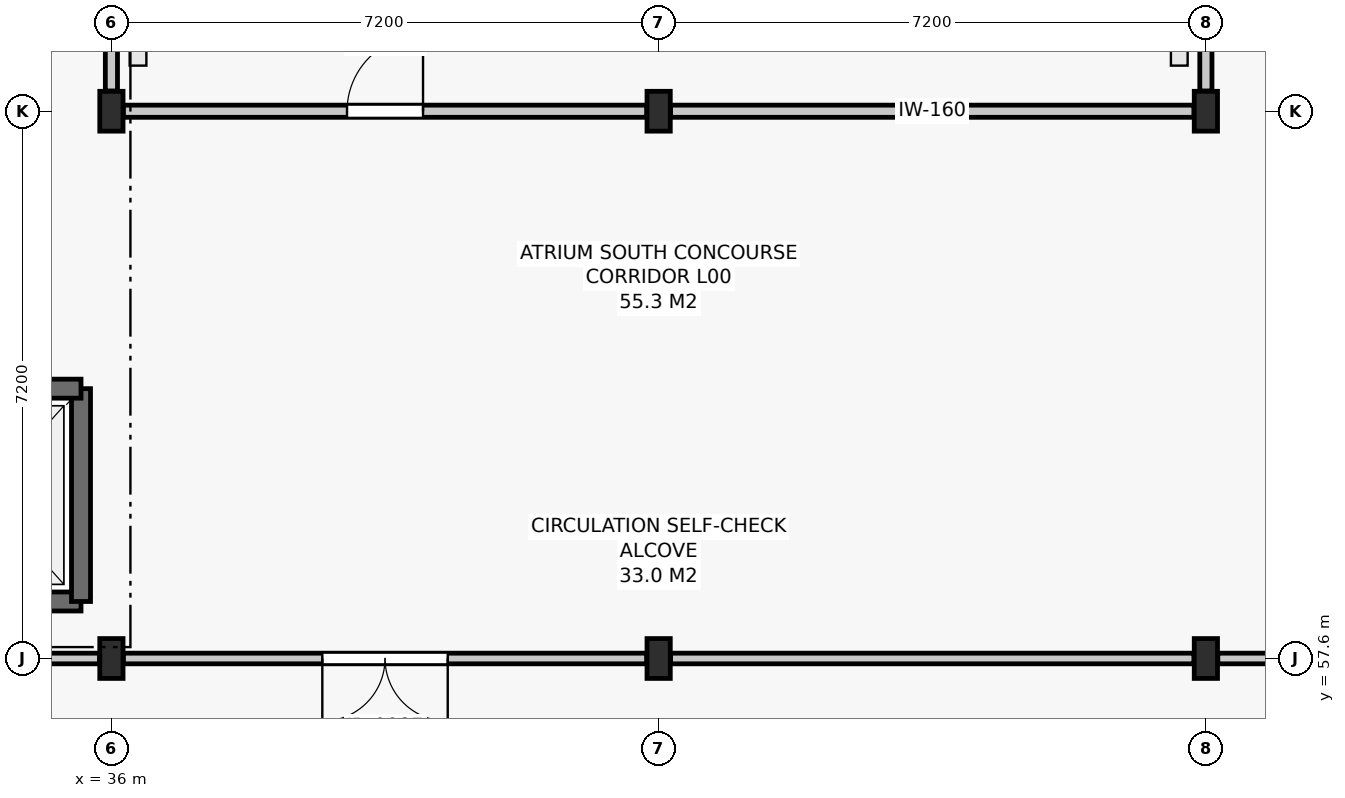
"""IFC4 building model, lengths in metres.
Left out: names, types, materials, properties, quantities, classifications, styles, units other than length and angle.
Written with IfcOpenShell. Run it as: python <this file> out.ifc"""

import sys

from ifc_helpers import new_model, si_unit, direction, frame, frame_2d, origin, origin_2d, place, context, subcontext, project, spatial, rectangle, i_section, extrude, element, fill, save


model = new_model("IFC4")
c1 = context("Model", 3, precision=1e-05, world=origin(), true_north=direction((0.0, 1.0)))
c2 = subcontext(c1, "Body", "Model", "MODEL_VIEW")
j1 = project(units=[si_unit("LENGTHUNIT", "METRE"), si_unit("PLANEANGLEUNIT", "RADIAN")], contexts=[c1])
p1 = place(None, origin())
s1 = spatial("IfcSite", under=j1, at=p1, CompositionType="ELEMENT")
p2 = place(p1, origin())
s2 = spatial("IfcBuilding", under=s1, at=p2, CompositionType="ELEMENT")
p3 = place(p2, origin())
s3 = spatial("IfcBuildingStorey", under=s2, at=p3, CompositionType="ELEMENT", Elevation=0.0)
for number, where, z_axis, x_axis in (
    (1, (36.0, 57.6, 0.0), (0.0, 0.0, 1.0), (1.0, 0.0, 0.0)),
    (2, (36.0, 64.8, 0.0), (0.0, 0.0, 1.0), (1.0, 0.0, 0.0)),
    (3, (43.2, 57.6, 0.0), (0.0, 0.0, 1.0), (1.0, 0.0, 0.0)),
    (4, (43.2, 64.8, 0.0), (0.0, 0.0, 1.0), (1.0, 0.0, 0.0)),
    (5, (50.4, 57.6, 0.0), (0.0, 0.0, 1.0), (1.0, 0.0, 0.0)),
    (6, (50.4, 64.8, 0.0), (0.0, 0.0, 1.0), (1.0, 0.0, 0.0)),
):
    element("IfcColumn", number, at=place(p3, frame(where, z_axis=z_axis, x_axis=x_axis)), inside=s3, PredefinedType="COLUMN", context=c2, shape_type="SweptSolid", body=[
        extrude(i_section(OverallWidth=0.306, OverallDepth=0.524, WebThickness=0.021, FlangeThickness=0.04, FilletRadius=0.027, at=origin_2d()), origin(), (0.0, 0.0, 1.0), 5.4),
    ])
p4 = place(p3, frame((33.05, 58.35, 0.0), z_axis=(0.0, 0.0, 1.0), x_axis=(1.0, 0.0, 0.0)))
e7 = element("IfcWall", 7, at=p4, inside=s3, PredefinedType="SHEAR", context=c2, shape_type="SweptSolid", body=[
    extrude(rectangle(XDim=2.55, YDim=0.25, at=frame_2d((1.275, 0.0))), origin(), (0.0, 0.0, 1.0), 5.12),
])
p5 = place(p3, frame((35.6, 58.35, 0.0), z_axis=(0.0, 0.0, 1.0), x_axis=(0.0, 1.0, 0.0)))
e8 = element("IfcWall", 8, at=p5, inside=s3, PredefinedType="SHEAR", context=c2, shape_type="SweptSolid", body=[
    extrude(rectangle(XDim=2.8, YDim=0.25, at=frame_2d((1.4, 0.0))), origin(), (0.0, 0.0, 1.0), 5.12),
])
p6 = place(p3, frame((35.6, 61.15, 0.0), z_axis=(0.0, 0.0, 1.0), x_axis=(-1.0, 0.0, 0.0)))
e9 = element("IfcWall", 9, at=p6, inside=s3, PredefinedType="SHEAR", context=c2, shape_type="SweptSolid", body=[
    extrude(rectangle(XDim=2.55, YDim=0.25, at=frame_2d((1.275, 0.0))), origin(), (0.0, 0.0, 1.0), 5.12),
])
p7 = place(p6, frame((0.725, 0.0, 0.0)))
e10 = element("IfcOpeningElement", 10, at=p7, cuts=e9, PredefinedType="OPENING", context=c2, shape_type="SweptSolid", body=[
    extrude(rectangle(XDim=1.1, YDim=2.1, at=frame_2d((0.55, 1.05))), frame((0.0, 0.137, 0.0), z_axis=(0.0, -1.0, 0.0), x_axis=(1.0, 0.0, 0.0)), (0.0, 0.0, 1.0), 0.274),
])
p8 = place(p3, frame((36.157, 64.8, 0.0), z_axis=(0.0, 0.0, 1.0), x_axis=(1.0, 0.0, 0.0)))
e11 = element("IfcWall", 11, at=p8, inside=s3, PredefinedType="PARTITIONING", context=c2, shape_type="SweptSolid", body=[
    extrude(rectangle(XDim=6.886, YDim=0.16, at=frame_2d((3.443, 0.0))), origin(), (0.0, 0.0, 1.0), 5.105),
])
p9 = place(p8, frame((2.943, 0.0, 0.0)))
e12 = element("IfcOpeningElement", 12, at=p9, cuts=e11, PredefinedType="OPENING", context=c2, shape_type="SweptSolid", body=[
    extrude(rectangle(XDim=1.0, YDim=2.15, at=frame_2d((0.5, 1.075))), frame((0.0, 0.092, 0.0), z_axis=(0.0, -1.0, 0.0), x_axis=(1.0, 0.0, 0.0)), (0.0, 0.0, 1.0), 0.184),
])
p10 = place(p3, frame((43.357, 64.8, 0.0), z_axis=(0.0, 0.0, 1.0), x_axis=(1.0, 0.0, 0.0)))
e13 = element("IfcWall", 13, at=p10, inside=s3, PredefinedType="PARTITIONING", context=c2, shape_type="SweptSolid", body=[
    extrude(rectangle(XDim=6.886, YDim=0.16, at=frame_2d((3.443, 0.0))), origin(), (0.0, 0.0, 1.0), 5.105),
])
p11 = place(p3, frame((28.954, 57.6, 0.0), z_axis=(0.0, 0.0, 1.0), x_axis=(1.0, 0.0, 0.0)))
e14 = element("IfcWall", 14, at=p11, inside=s3, PredefinedType="PARTITIONING", context=c2, shape_type="SweptSolid", body=[
    extrude(rectangle(XDim=6.889, YDim=0.14, at=frame_2d((3.444, 0.0))), origin(), (0.0, 0.0, 1.0), 4.615),
])
p12 = place(p3, frame((36.157, 57.6, 0.0), z_axis=(0.0, 0.0, 1.0), x_axis=(1.0, 0.0, 0.0)))
e15 = element("IfcWall", 15, at=p12, inside=s3, PredefinedType="PARTITIONING", context=c2, shape_type="SweptSolid", body=[
    extrude(rectangle(XDim=6.886, YDim=0.14, at=frame_2d((3.443, 0.0))), origin(), (0.0, 0.0, 1.0), 4.615),
])
p13 = place(p12, frame((2.618, 0.0, 0.0)))
e16 = element("IfcOpeningElement", 16, at=p13, cuts=e15, PredefinedType="OPENING", context=c2, shape_type="SweptSolid", body=[
    extrude(rectangle(XDim=1.65, YDim=2.25, at=frame_2d((0.825, 1.125))), frame((0.0, 0.082, 0.0), z_axis=(0.0, -1.0, 0.0), x_axis=(1.0, 0.0, 0.0)), (0.0, 0.0, 1.0), 0.164),
])
p14 = place(p3, frame((43.357, 57.6, 0.0), z_axis=(0.0, 0.0, 1.0), x_axis=(1.0, 0.0, 0.0)))
e17 = element("IfcWall", 17, at=p14, inside=s3, PredefinedType="PARTITIONING", context=c2, shape_type="SweptSolid", body=[
    extrude(rectangle(XDim=6.886, YDim=0.14, at=frame_2d((3.443, 0.0))), origin(), (0.0, 0.0, 1.0), 4.615),
])
p15 = place(p3, frame((50.557, 57.6, 0.0), z_axis=(0.0, 0.0, 1.0), x_axis=(1.0, 0.0, 0.0)))
e18 = element("IfcWall", 18, at=p15, inside=s3, PredefinedType="PARTITIONING", context=c2, shape_type="SweptSolid", body=[
    extrude(rectangle(XDim=6.889, YDim=0.14, at=frame_2d((3.445, 0.0))), origin(), (0.0, 0.0, 1.0), 4.615),
])
for number, where, z_axis, x_axis in (
    (19, (36.0, 65.066, 0.0), (0.0, 0.0, 1.0), (0.0, 1.0, 0.0)),
    (20, (50.4, 65.066, 0.0), (0.0, 0.0, 1.0), (0.0, 1.0, 0.0)),
):
    element("IfcWall", number, at=place(p3, frame(where, z_axis=z_axis, x_axis=x_axis)), inside=s3, PredefinedType="PARTITIONING", context=c2, shape_type="SweptSolid", body=[
        extrude(rectangle(XDim=6.668, YDim=0.16, at=frame_2d((3.334, 0.0))), origin(), (0.0, 0.0, 1.0), 5.105),
    ])
p16 = place(p9, origin())
e21 = element("IfcDoor", 21, at=p16, inside=s3, OperationType="SINGLE_SWING_RIGHT", PredefinedType="DOOR", context=c2, shape_type="SweptSolid", body=[
    extrude(rectangle(XDim=1.0, YDim=2.15, at=frame_2d((0.5, 1.075))), frame((0.0, 0.025, 0.0), z_axis=(0.0, -1.0, 0.0), x_axis=(1.0, 0.0, 0.0)), (0.0, 0.0, 1.0), 0.05),
])
fill(e12, e21)
p17 = place(p13, frame((1.65, 0.0, 0.0), z_axis=(0.0, 0.0, 1.0), x_axis=(-1.0, 0.0, 0.0)))
e22 = element("IfcDoor", 22, at=p17, inside=s3, OperationType="DOUBLE_DOOR_SINGLE_SWING", PredefinedType="DOOR", context=c2, shape_type="SweptSolid", body=[
    extrude(rectangle(XDim=1.65, YDim=2.25, at=frame_2d((0.825, 1.125))), frame((0.0, 0.025, 0.0), z_axis=(0.0, -1.0, 0.0), x_axis=(1.0, 0.0, 0.0)), (0.0, 0.0, 1.0), 0.05),
])
fill(e16, e22)
save(model, sys.argv[1])
